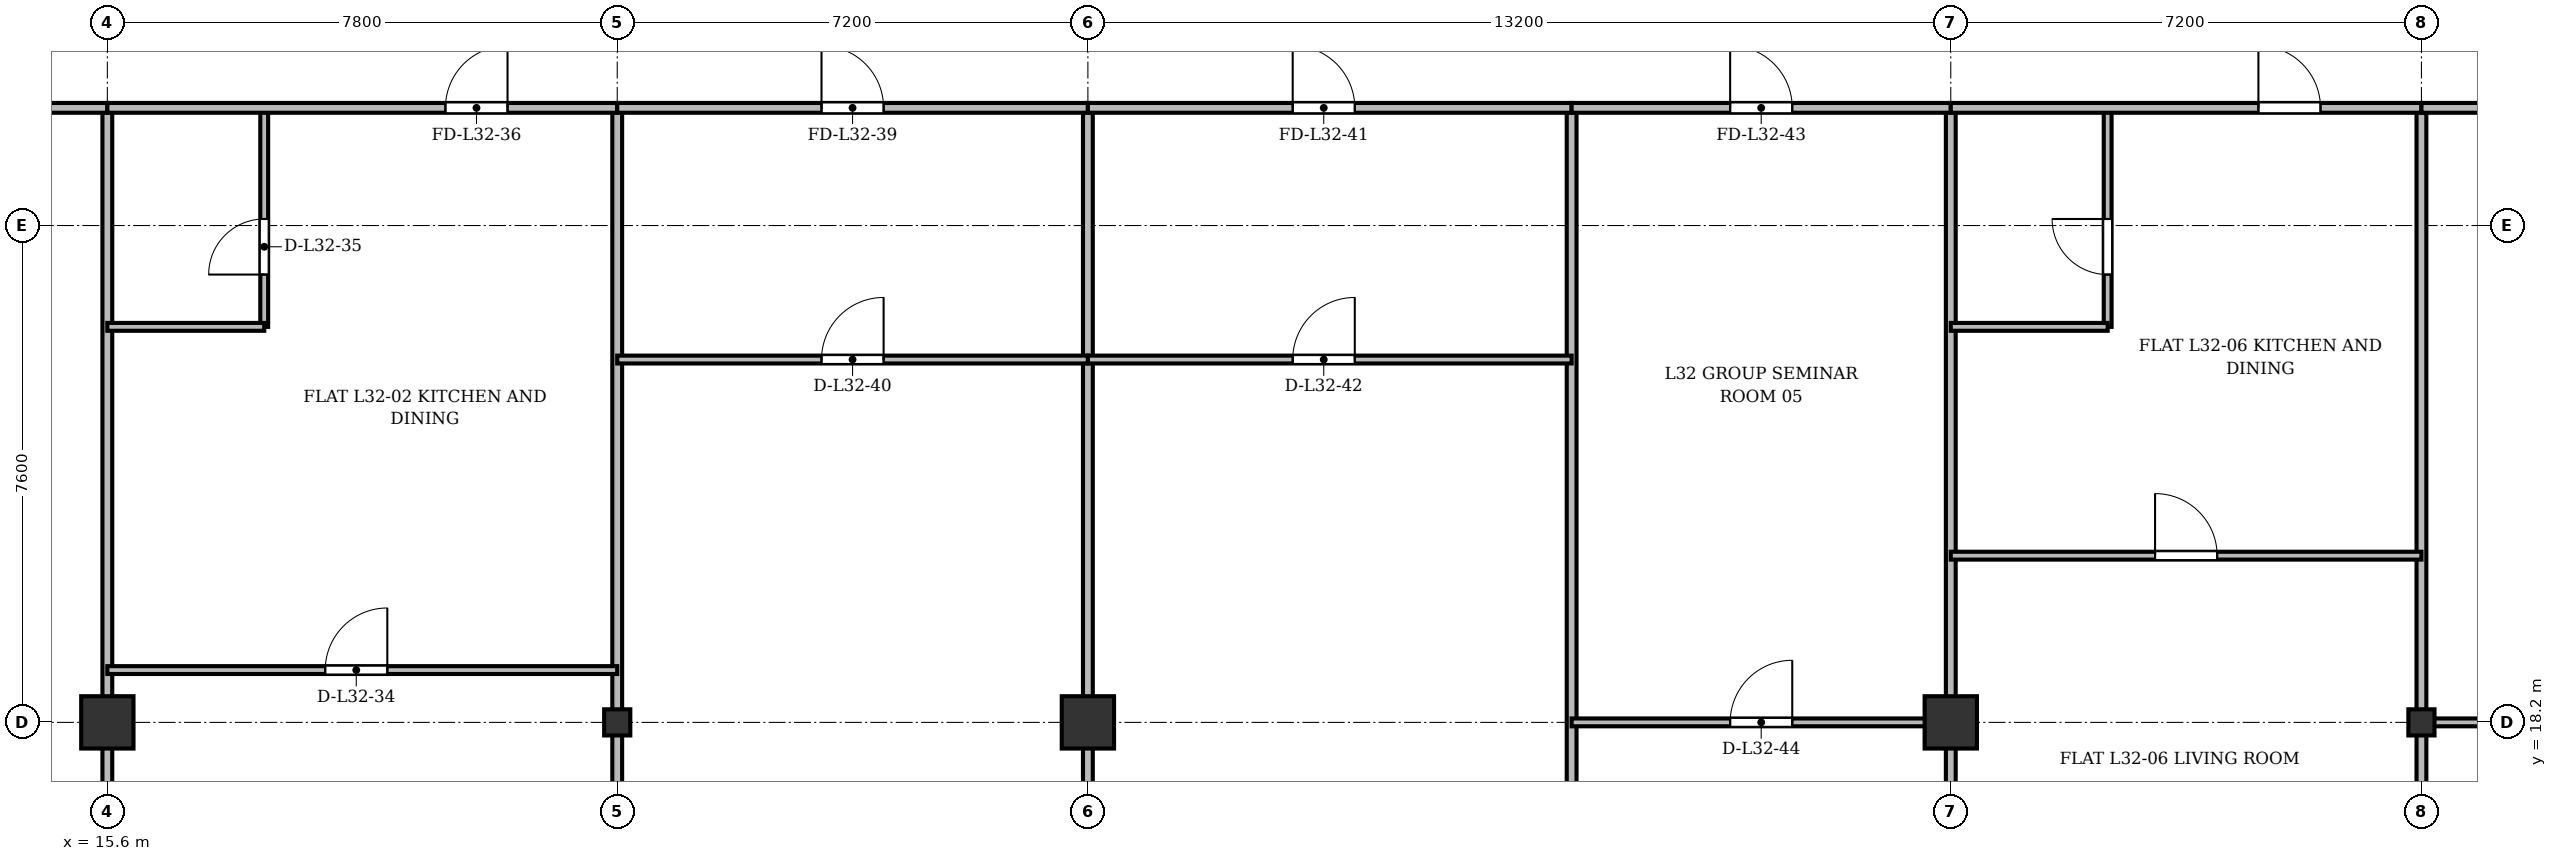
"""IFC4 building model, lengths in metres.
Left out: names, types, materials, properties, quantities, classifications, styles, units other than length and angle.
Written with IfcOpenShell. Run it as: python <this file> out.ifc"""

import sys

from ifc_helpers import new_model, si_unit, direction, frame, frame_2d, origin, origin_2d, place, context, subcontext, project, spatial, rectangle, i_section, extrude, source, transform, mapped, element, fill, save


model = new_model("IFC4")
c1 = context("Model", 3, precision=1e-05, world=origin(), true_north=direction((0.0, 1.0)))
c2 = subcontext(c1, "Body", "Model", "MODEL_VIEW")
j1 = project(units=[si_unit("LENGTHUNIT", "METRE"), si_unit("PLANEANGLEUNIT", "RADIAN")], contexts=[c1])
p1 = place(None, origin())
s1 = spatial("IfcSite", under=j1, at=p1, CompositionType="ELEMENT")
p2 = place(p1, origin())
s2 = spatial("IfcBuilding", under=s1, at=p2, CompositionType="ELEMENT")
p3 = place(p2, frame((0.0, 0.0, 124.9)))
s3 = spatial("IfcBuildingStorey", under=s2, at=p3, CompositionType="ELEMENT", Elevation=124.9)
m1 = source(origin(), c2, "Body", "SweptSolid", [
    extrude(rectangle(XDim=0.8, YDim=0.8, at=origin_2d()), origin(), (0.0, 0.0, 1.0), 3.6),
])
p4 = place(p3, frame((15.6, 18.2, 0.0), z_axis=(0.0, 0.0, 1.0), x_axis=(1.0, 0.0, 0.0)))
e1 = element("IfcColumn", 1, at=p4, inside=s3, PredefinedType="COLUMN", context=c2, shape_type="MappedRepresentation", body=[
    mapped(m1, transform((0.0, 0.0, 0.0), x_axis=(1.0, 0.0, 0.0), y_axis=(0.0, 1.0, 0.0), z_axis=(0.0, 0.0, 1.0), scale=1.0)),
])
m2 = source(origin(), c2, "Body", "SweptSolid", [
    extrude(i_section(OverallWidth=0.4, OverallDepth=0.4, WebThickness=0.022, FlangeThickness=0.035, at=origin_2d()), origin(), (0.0, 0.0, 1.0), 3.6),
])
p5 = place(p3, frame((23.4, 18.2, 0.0), z_axis=(0.0, 0.0, 1.0), x_axis=(1.0, 0.0, 0.0)))
e2 = element("IfcColumn", 2, at=p5, inside=s3, PredefinedType="COLUMN", context=c2, shape_type="MappedRepresentation", body=[
    mapped(m2, transform((0.0, 0.0, 0.0), x_axis=(1.0, 0.0, 0.0), y_axis=(0.0, 1.0, 0.0), z_axis=(0.0, 0.0, 1.0), scale=1.0)),
])
for number, where, z_axis, x_axis in (
    (3, (30.6, 18.2, 0.0), (0.0, 0.0, 1.0), (1.0, 0.0, 0.0)),
    (4, (43.8, 18.2, 0.0), (0.0, 0.0, 1.0), (1.0, 0.0, 0.0)),
):
    element("IfcColumn", number, at=place(p3, frame(where, z_axis=z_axis, x_axis=x_axis)), inside=s3, PredefinedType="COLUMN", context=c2, shape_type="MappedRepresentation", body=[
        mapped(m1, transform((0.0, 0.0, 0.0), x_axis=(1.0, 0.0, 0.0), y_axis=(0.0, 1.0, 0.0), z_axis=(0.0, 0.0, 1.0), scale=1.0)),
    ])
p6 = place(p3, frame((51.0, 18.2, 0.0), z_axis=(0.0, 0.0, 1.0), x_axis=(1.0, 0.0, 0.0)))
e5 = element("IfcColumn", 5, at=p6, inside=s3, PredefinedType="COLUMN", context=c2, shape_type="MappedRepresentation", body=[
    mapped(m2, transform((0.0, 0.0, 0.0), x_axis=(1.0, 0.0, 0.0), y_axis=(0.0, 1.0, 0.0), z_axis=(0.0, 0.0, 1.0), scale=1.0)),
])
for number, where, z_axis, x_axis in (
    (6, (15.6, 3.145, 0.0), (0.0, 0.0, 1.0), (0.0, 1.0, 0.0)),
    (7, (23.4, 3.145, 0.0), (0.0, 0.0, 1.0), (0.0, 1.0, 0.0)),
    (8, (30.6, 3.145, 0.0), (0.0, 0.0, 1.0), (0.0, 1.0, 0.0)),
):
    element("IfcWall", number, at=place(p3, frame(where, z_axis=z_axis, x_axis=x_axis)), inside=s3, PredefinedType="PARTITIONING", context=c2, shape_type="SweptSolid", body=[
        extrude(rectangle(XDim=24.455, YDim=0.15, at=frame_2d((12.228, 0.0))), origin(), (0.0, 0.0, 1.0), 2.84),
    ])
p7 = place(p3, frame((38.0, 3.145, 0.0), z_axis=(0.0, 0.0, 1.0), x_axis=(0.0, 1.0, 0.0)))
e9 = element("IfcWall", 9, at=p7, inside=s3, PredefinedType="PARTITIONING", context=c2, shape_type="SweptSolid", body=[
    extrude(rectangle(XDim=24.455, YDim=0.15, at=frame_2d((12.228, 0.0))), origin(), (0.0, 0.0, 1.0), 2.752),
])
p8 = place(p3, frame((43.8, 3.145, 0.0), z_axis=(0.0, 0.0, 1.0), x_axis=(0.0, 1.0, 0.0)))
e10 = element("IfcWall", 10, at=p8, inside=s3, PredefinedType="PARTITIONING", context=c2, shape_type="SweptSolid", body=[
    extrude(rectangle(XDim=24.455, YDim=0.15, at=frame_2d((12.228, 0.0))), origin(), (0.0, 0.0, 1.0), 2.84),
])
p9 = place(p3, frame((51.0, 6.41, 0.0), z_axis=(0.0, 0.0, 1.0), x_axis=(0.0, 1.0, 0.0)))
e11 = element("IfcWall", 11, at=p9, inside=s3, PredefinedType="PARTITIONING", context=c2, shape_type="SweptSolid", body=[
    extrude(rectangle(XDim=21.19, YDim=0.15, at=frame_2d((10.595, 0.0))), origin(), (0.0, 0.0, 1.0), 2.84),
])
p10 = place(p3, frame((4.745, 27.6, 0.0), z_axis=(0.0, 0.0, 1.0), x_axis=(1.0, 0.0, 0.0)))
e12 = element("IfcWall", 12, at=p10, inside=s3, PredefinedType="PARTITIONING", context=c2, shape_type="SweptSolid", body=[
    extrude(rectangle(XDim=10.855, YDim=0.15, at=frame_2d((5.427, 0.0))), origin(), (0.0, 0.0, 1.0), 2.84),
])
p11 = place(p10, frame((4.537, 0.0, 0.0)))
e13 = element("IfcOpeningElement", 13, at=p11, cuts=e12, PredefinedType="OPENING", context=c2, shape_type="SweptSolid", body=[
    extrude(rectangle(XDim=1.6, YDim=2.2, at=frame_2d((0.8, 1.1))), frame((0.0, 0.085, 0.0), z_axis=(0.0, -1.0, 0.0), x_axis=(1.0, 0.0, 0.0)), (0.0, 0.0, 1.0), 0.17),
])
p12 = place(p3, frame((15.6, 19.0, 0.0), z_axis=(0.0, 0.0, 1.0), x_axis=(1.0, 0.0, 0.0)))
e14 = element("IfcWall", 14, at=p12, inside=s3, PredefinedType="PARTITIONING", context=c2, shape_type="SweptSolid", body=[
    extrude(rectangle(XDim=7.8, YDim=0.12, at=frame_2d((3.9, 0.0))), origin(), (0.0, 0.0, 1.0), 2.84),
])
p13 = place(p12, frame((3.333, 0.0, 0.0)))
e15 = element("IfcOpeningElement", 15, at=p13, cuts=e14, PredefinedType="OPENING", context=c2, shape_type="SweptSolid", body=[
    extrude(rectangle(XDim=0.95, YDim=2.15, at=frame_2d((0.475, 1.075))), frame((0.0, 0.07, 0.0), z_axis=(0.0, -1.0, 0.0), x_axis=(1.0, 0.0, 0.0)), (0.0, 0.0, 1.0), 0.14),
])
p14 = place(p3, frame((18.0, 24.25, 0.0), z_axis=(0.0, 0.0, 1.0), x_axis=(0.0, 1.0, 0.0)))
e16 = element("IfcWall", 16, at=p14, inside=s3, PredefinedType="PARTITIONING", context=c2, shape_type="SweptSolid", body=[
    extrude(rectangle(XDim=3.35, YDim=0.12, at=frame_2d((1.675, 0.0))), origin(), (0.0, 0.0, 1.0), 2.99),
])
p15 = place(p14, frame((0.8, 0.0, 0.0)))
e17 = element("IfcOpeningElement", 17, at=p15, cuts=e16, PredefinedType="OPENING", context=c2, shape_type="SweptSolid", body=[
    extrude(rectangle(XDim=0.85, YDim=2.1, at=frame_2d((0.425, 1.05))), frame((0.0, 0.07, 0.0), z_axis=(0.0, -1.0, 0.0), x_axis=(1.0, 0.0, 0.0)), (0.0, 0.0, 1.0), 0.14),
])
p16 = place(p3, frame((15.6, 24.25, 0.0), z_axis=(0.0, 0.0, 1.0), x_axis=(1.0, 0.0, 0.0)))
e18 = element("IfcWall", 18, at=p16, inside=s3, PredefinedType="PARTITIONING", context=c2, shape_type="SweptSolid", body=[
    extrude(rectangle(XDim=2.4, YDim=0.12, at=frame_2d((1.2, 0.0))), origin(), (0.0, 0.0, 1.0), 2.84),
])
p17 = place(p3, frame((15.6, 27.6, 0.0), z_axis=(0.0, 0.0, 1.0), x_axis=(1.0, 0.0, 0.0)))
e19 = element("IfcWall", 19, at=p17, inside=s3, PredefinedType="PARTITIONING", context=c2, shape_type="SweptSolid", body=[
    extrude(rectangle(XDim=7.8, YDim=0.15, at=frame_2d((3.9, 0.0))), origin(), (0.0, 0.0, 1.0), 2.84),
])
p18 = place(p17, frame((5.172, 0.0, 0.0)))
e20 = element("IfcOpeningElement", 20, at=p18, cuts=e19, PredefinedType="OPENING", context=c2, shape_type="SweptSolid", body=[
    extrude(rectangle(XDim=0.95, YDim=2.15, at=frame_2d((0.475, 1.075))), frame((0.0, 0.085, 0.0), z_axis=(0.0, -1.0, 0.0), x_axis=(1.0, 0.0, 0.0)), (0.0, 0.0, 1.0), 0.17),
])
p19 = place(p3, frame((23.4, 27.6, 0.0), z_axis=(0.0, 0.0, 1.0), x_axis=(1.0, 0.0, 0.0)))
e21 = element("IfcWall", 21, at=p19, inside=s3, PredefinedType="PARTITIONING", context=c2, shape_type="SweptSolid", body=[
    extrude(rectangle(XDim=7.2, YDim=0.15, at=frame_2d((3.6, 0.0))), origin(), (0.0, 0.0, 1.0), 2.84),
])
p20 = place(p19, frame((3.125, 0.0, 0.0)))
e22 = element("IfcOpeningElement", 22, at=p20, cuts=e21, PredefinedType="OPENING", context=c2, shape_type="SweptSolid", body=[
    extrude(rectangle(XDim=0.95, YDim=2.15, at=frame_2d((0.475, 1.075))), frame((0.0, 0.085, 0.0), z_axis=(0.0, -1.0, 0.0), x_axis=(1.0, 0.0, 0.0)), (0.0, 0.0, 1.0), 0.17),
])
p21 = place(p3, frame((23.4, 23.75, 0.0), z_axis=(0.0, 0.0, 1.0), x_axis=(1.0, 0.0, 0.0)))
e23 = element("IfcWall", 23, at=p21, inside=s3, PredefinedType="PARTITIONING", context=c2, shape_type="SweptSolid", body=[
    extrude(rectangle(XDim=7.2, YDim=0.12, at=frame_2d((3.6, 0.0))), origin(), (0.0, 0.0, 1.0), 2.84),
])
p22 = place(p21, frame((3.125, 0.0, 0.0)))
e24 = element("IfcOpeningElement", 24, at=p22, cuts=e23, PredefinedType="OPENING", context=c2, shape_type="SweptSolid", body=[
    extrude(rectangle(XDim=0.95, YDim=2.15, at=frame_2d((0.475, 1.075))), frame((0.0, 0.07, 0.0), z_axis=(0.0, -1.0, 0.0), x_axis=(1.0, 0.0, 0.0)), (0.0, 0.0, 1.0), 0.14),
])
p23 = place(p3, frame((30.6, 27.6, 0.0), z_axis=(0.0, 0.0, 1.0), x_axis=(1.0, 0.0, 0.0)))
e25 = element("IfcWall", 25, at=p23, inside=s3, PredefinedType="PARTITIONING", context=c2, shape_type="SweptSolid", body=[
    extrude(rectangle(XDim=7.4, YDim=0.15, at=frame_2d((3.7, 0.0))), origin(), (0.0, 0.0, 1.0), 2.84),
])
p24 = place(p23, frame((3.133, 0.0, 0.0)))
e26 = element("IfcOpeningElement", 26, at=p24, cuts=e25, PredefinedType="OPENING", context=c2, shape_type="SweptSolid", body=[
    extrude(rectangle(XDim=0.95, YDim=2.15, at=frame_2d((0.475, 1.075))), frame((0.0, 0.085, 0.0), z_axis=(0.0, -1.0, 0.0), x_axis=(1.0, 0.0, 0.0)), (0.0, 0.0, 1.0), 0.17),
])
p25 = place(p3, frame((30.6, 23.75, 0.0), z_axis=(0.0, 0.0, 1.0), x_axis=(1.0, 0.0, 0.0)))
e27 = element("IfcWall", 27, at=p25, inside=s3, PredefinedType="PARTITIONING", context=c2, shape_type="SweptSolid", body=[
    extrude(rectangle(XDim=7.4, YDim=0.12, at=frame_2d((3.7, 0.0))), origin(), (0.0, 0.0, 1.0), 2.84),
])
p26 = place(p25, frame((3.133, 0.0, 0.0)))
e28 = element("IfcOpeningElement", 28, at=p26, cuts=e27, PredefinedType="OPENING", context=c2, shape_type="SweptSolid", body=[
    extrude(rectangle(XDim=0.95, YDim=2.15, at=frame_2d((0.475, 1.075))), frame((0.0, 0.07, 0.0), z_axis=(0.0, -1.0, 0.0), x_axis=(1.0, 0.0, 0.0)), (0.0, 0.0, 1.0), 0.14),
])
p27 = place(p3, frame((38.0, 27.6, 0.0), z_axis=(0.0, 0.0, 1.0), x_axis=(1.0, 0.0, 0.0)))
e29 = element("IfcWall", 29, at=p27, inside=s3, PredefinedType="PARTITIONING", context=c2, shape_type="SweptSolid", body=[
    extrude(rectangle(XDim=5.8, YDim=0.15, at=frame_2d((2.9, 0.0))), origin(), (0.0, 0.0, 1.0), 2.84),
])
p28 = place(p27, frame((2.425, 0.0, 0.0)))
e30 = element("IfcOpeningElement", 30, at=p28, cuts=e29, PredefinedType="OPENING", context=c2, shape_type="SweptSolid", body=[
    extrude(rectangle(XDim=0.95, YDim=2.15, at=frame_2d((0.475, 1.075))), frame((0.0, 0.085, 0.0), z_axis=(0.0, -1.0, 0.0), x_axis=(1.0, 0.0, 0.0)), (0.0, 0.0, 1.0), 0.17),
])
p29 = place(p3, frame((38.0, 18.2, 0.0), z_axis=(0.0, 0.0, 1.0), x_axis=(1.0, 0.0, 0.0)))
e31 = element("IfcWall", 31, at=p29, inside=s3, PredefinedType="PARTITIONING", context=c2, shape_type="SweptSolid", body=[
    extrude(rectangle(XDim=5.8, YDim=0.12, at=frame_2d((2.9, 0.0))), origin(), (0.0, 0.0, 1.0), 2.752),
])
p30 = place(p29, frame((2.425, 0.0, 0.0)))
e32 = element("IfcOpeningElement", 32, at=p30, cuts=e31, PredefinedType="OPENING", context=c2, shape_type="SweptSolid", body=[
    extrude(rectangle(XDim=0.95, YDim=2.15, at=frame_2d((0.475, 1.075))), frame((0.0, 0.07, 0.0), z_axis=(0.0, -1.0, 0.0), x_axis=(1.0, 0.0, 0.0)), (0.0, 0.0, 1.0), 0.14),
])
p31 = place(p3, frame((43.8, 20.75, 0.0), z_axis=(0.0, 0.0, 1.0), x_axis=(1.0, 0.0, 0.0)))
e33 = element("IfcWall", 33, at=p31, inside=s3, PredefinedType="PARTITIONING", context=c2, shape_type="SweptSolid", body=[
    extrude(rectangle(XDim=7.2, YDim=0.12, at=frame_2d((3.6, 0.0))), origin(), (0.0, 0.0, 1.0), 2.84),
])
p32 = place(p31, frame((3.125, 0.0, 0.0)))
e34 = element("IfcOpeningElement", 34, at=p32, cuts=e33, PredefinedType="OPENING", context=c2, shape_type="SweptSolid", body=[
    extrude(rectangle(XDim=0.95, YDim=2.15, at=frame_2d((0.475, 1.075))), frame((0.0, 0.07, 0.0), z_axis=(0.0, -1.0, 0.0), x_axis=(1.0, 0.0, 0.0)), (0.0, 0.0, 1.0), 0.14),
])
p33 = place(p3, frame((46.2, 24.25, 0.0), z_axis=(0.0, 0.0, 1.0), x_axis=(0.0, 1.0, 0.0)))
e35 = element("IfcWall", 35, at=p33, inside=s3, PredefinedType="PARTITIONING", context=c2, shape_type="SweptSolid", body=[
    extrude(rectangle(XDim=3.35, YDim=0.12, at=frame_2d((1.675, 0.0))), origin(), (0.0, 0.0, 1.0), 2.99),
])
p34 = place(p33, frame((0.8, 0.0, 0.0)))
e36 = element("IfcOpeningElement", 36, at=p34, cuts=e35, PredefinedType="OPENING", context=c2, shape_type="SweptSolid", body=[
    extrude(rectangle(XDim=0.85, YDim=2.1, at=frame_2d((0.425, 1.05))), frame((0.0, 0.07, 0.0), z_axis=(0.0, -1.0, 0.0), x_axis=(1.0, 0.0, 0.0)), (0.0, 0.0, 1.0), 0.14),
])
p35 = place(p3, frame((43.8, 24.25, 0.0), z_axis=(0.0, 0.0, 1.0), x_axis=(1.0, 0.0, 0.0)))
e37 = element("IfcWall", 37, at=p35, inside=s3, PredefinedType="PARTITIONING", context=c2, shape_type="SweptSolid", body=[
    extrude(rectangle(XDim=2.4, YDim=0.12, at=frame_2d((1.2, 0.0))), origin(), (0.0, 0.0, 1.0), 2.84),
])
p36 = place(p3, frame((43.8, 27.6, 0.0), z_axis=(0.0, 0.0, 1.0), x_axis=(1.0, 0.0, 0.0)))
e38 = element("IfcWall", 38, at=p36, inside=s3, PredefinedType="PARTITIONING", context=c2, shape_type="SweptSolid", body=[
    extrude(rectangle(XDim=7.2, YDim=0.15, at=frame_2d((3.6, 0.0))), origin(), (0.0, 0.0, 1.0), 2.84),
])
p37 = place(p36, frame((4.706, 0.0, 0.0)))
e39 = element("IfcOpeningElement", 39, at=p37, cuts=e38, PredefinedType="OPENING", context=c2, shape_type="SweptSolid", body=[
    extrude(rectangle(XDim=0.95, YDim=2.15, at=frame_2d((0.475, 1.075))), frame((0.0, 0.085, 0.0), z_axis=(0.0, -1.0, 0.0), x_axis=(1.0, 0.0, 0.0)), (0.0, 0.0, 1.0), 0.17),
])
p38 = place(p3, frame((51.0, 27.6, 0.0), z_axis=(0.0, 0.0, 1.0), x_axis=(1.0, 0.0, 0.0)))
e40 = element("IfcWall", 40, at=p38, inside=s3, PredefinedType="PARTITIONING", context=c2, shape_type="SweptSolid", body=[
    extrude(rectangle(XDim=7.8, YDim=0.15, at=frame_2d((3.9, 0.0))), origin(), (0.0, 0.0, 1.0), 2.84),
])
p39 = place(p38, frame((3.333, 0.0, 0.0)))
e41 = element("IfcOpeningElement", 41, at=p39, cuts=e40, PredefinedType="OPENING", context=c2, shape_type="SweptSolid", body=[
    extrude(rectangle(XDim=0.95, YDim=2.15, at=frame_2d((0.475, 1.075))), frame((0.0, 0.085, 0.0), z_axis=(0.0, -1.0, 0.0), x_axis=(1.0, 0.0, 0.0)), (0.0, 0.0, 1.0), 0.17),
])
p40 = place(p3, frame((51.0, 18.2, 0.0), z_axis=(0.0, 0.0, 1.0), x_axis=(1.0, 0.0, 0.0)))
e42 = element("IfcWall", 42, at=p40, inside=s3, PredefinedType="PARTITIONING", context=c2, shape_type="SweptSolid", body=[
    extrude(rectangle(XDim=7.8, YDim=0.12, at=frame_2d((3.9, 0.0))), origin(), (0.0, 0.0, 1.0), 2.752),
])
p41 = place(p40, frame((3.333, 0.0, 0.0)))
e43 = element("IfcOpeningElement", 43, at=p41, cuts=e42, PredefinedType="OPENING", context=c2, shape_type="SweptSolid", body=[
    extrude(rectangle(XDim=0.95, YDim=2.15, at=frame_2d((0.475, 1.075))), frame((0.0, 0.07, 0.0), z_axis=(0.0, -1.0, 0.0), x_axis=(1.0, 0.0, 0.0)), (0.0, 0.0, 1.0), 0.14),
])
m3 = source(origin(), c2, "Body", "SweptSolid", [
    extrude(rectangle(XDim=0.95, YDim=2.15, at=frame_2d((0.475, 1.075))), frame((0.0, 0.025, 0.0), z_axis=(0.0, -1.0, 0.0), x_axis=(1.0, 0.0, 0.0)), (0.0, 0.0, 1.0), 0.05),
])
p42 = place(p13, origin())
e44 = element("IfcDoor", 44, at=p42, inside=s3, OperationType="SINGLE_SWING_RIGHT", PredefinedType="DOOR", context=c2, shape_type="MappedRepresentation", body=[
    mapped(m3, transform((0.0, 0.0, 0.0), x_axis=(1.0, 0.0, 0.0), y_axis=(0.0, 1.0, 0.0), z_axis=(0.0, 0.0, 1.0), scale=1.0)),
])
fill(e15, e44)
m4 = source(origin(), c2, "Body", "SweptSolid", [
    extrude(rectangle(XDim=0.85, YDim=2.1, at=frame_2d((0.425, 1.05))), frame((0.0, 0.025, 0.0), z_axis=(0.0, -1.0, 0.0), x_axis=(1.0, 0.0, 0.0)), (0.0, 0.0, 1.0), 0.05),
])
p43 = place(p15, origin())
e45 = element("IfcDoor", 45, at=p43, inside=s3, OperationType="SINGLE_SWING_LEFT", PredefinedType="DOOR", context=c2, shape_type="MappedRepresentation", body=[
    mapped(m4, transform((0.0, 0.0, 0.0), x_axis=(1.0, 0.0, 0.0), y_axis=(0.0, 1.0, 0.0), z_axis=(0.0, 0.0, 1.0), scale=1.0)),
])
fill(e17, e45)
p44 = place(p18, origin())
e46 = element("IfcDoor", 46, at=p44, inside=s3, OperationType="SINGLE_SWING_RIGHT", PredefinedType="DOOR", context=c2, shape_type="MappedRepresentation", body=[
    mapped(m3, transform((0.0, 0.0, 0.0), x_axis=(1.0, 0.0, 0.0), y_axis=(0.0, 1.0, 0.0), z_axis=(0.0, 0.0, 1.0), scale=1.0)),
])
fill(e20, e46)
p45 = place(p20, origin())
e47 = element("IfcDoor", 47, at=p45, inside=s3, OperationType="SINGLE_SWING_LEFT", PredefinedType="DOOR", context=c2, shape_type="MappedRepresentation", body=[
    mapped(m3, transform((0.0, 0.0, 0.0), x_axis=(1.0, 0.0, 0.0), y_axis=(0.0, 1.0, 0.0), z_axis=(0.0, 0.0, 1.0), scale=1.0)),
])
fill(e22, e47)
p46 = place(p22, origin())
e48 = element("IfcDoor", 48, at=p46, inside=s3, OperationType="SINGLE_SWING_RIGHT", PredefinedType="DOOR", context=c2, shape_type="MappedRepresentation", body=[
    mapped(m3, transform((0.0, 0.0, 0.0), x_axis=(1.0, 0.0, 0.0), y_axis=(0.0, 1.0, 0.0), z_axis=(0.0, 0.0, 1.0), scale=1.0)),
])
fill(e24, e48)
p47 = place(p24, origin())
e49 = element("IfcDoor", 49, at=p47, inside=s3, OperationType="SINGLE_SWING_LEFT", PredefinedType="DOOR", context=c2, shape_type="MappedRepresentation", body=[
    mapped(m3, transform((0.0, 0.0, 0.0), x_axis=(1.0, 0.0, 0.0), y_axis=(0.0, 1.0, 0.0), z_axis=(0.0, 0.0, 1.0), scale=1.0)),
])
fill(e26, e49)
p48 = place(p26, origin())
e50 = element("IfcDoor", 50, at=p48, inside=s3, OperationType="SINGLE_SWING_RIGHT", PredefinedType="DOOR", context=c2, shape_type="MappedRepresentation", body=[
    mapped(m3, transform((0.0, 0.0, 0.0), x_axis=(1.0, 0.0, 0.0), y_axis=(0.0, 1.0, 0.0), z_axis=(0.0, 0.0, 1.0), scale=1.0)),
])
fill(e28, e50)
p49 = place(p28, origin())
e51 = element("IfcDoor", 51, at=p49, inside=s3, OperationType="SINGLE_SWING_LEFT", PredefinedType="DOOR", context=c2, shape_type="MappedRepresentation", body=[
    mapped(m3, transform((0.0, 0.0, 0.0), x_axis=(1.0, 0.0, 0.0), y_axis=(0.0, 1.0, 0.0), z_axis=(0.0, 0.0, 1.0), scale=1.0)),
])
fill(e30, e51)
p50 = place(p30, origin())
e52 = element("IfcDoor", 52, at=p50, inside=s3, OperationType="SINGLE_SWING_RIGHT", PredefinedType="DOOR", context=c2, shape_type="MappedRepresentation", body=[
    mapped(m3, transform((0.0, 0.0, 0.0), x_axis=(1.0, 0.0, 0.0), y_axis=(0.0, 1.0, 0.0), z_axis=(0.0, 0.0, 1.0), scale=1.0)),
])
fill(e32, e52)
p51 = place(p32, origin())
e53 = element("IfcDoor", 53, at=p51, inside=s3, OperationType="SINGLE_SWING_LEFT", PredefinedType="DOOR", context=c2, shape_type="MappedRepresentation", body=[
    mapped(m3, transform((0.0, 0.0, 0.0), x_axis=(1.0, 0.0, 0.0), y_axis=(0.0, 1.0, 0.0), z_axis=(0.0, 0.0, 1.0), scale=1.0)),
])
fill(e34, e53)
p52 = place(p34, origin())
e54 = element("IfcDoor", 54, at=p52, inside=s3, OperationType="SINGLE_SWING_RIGHT", PredefinedType="DOOR", context=c2, shape_type="MappedRepresentation", body=[
    mapped(m4, transform((0.0, 0.0, 0.0), x_axis=(1.0, 0.0, 0.0), y_axis=(0.0, 1.0, 0.0), z_axis=(0.0, 0.0, 1.0), scale=1.0)),
])
fill(e36, e54)
p53 = place(p37, origin())
e55 = element("IfcDoor", 55, at=p53, inside=s3, OperationType="SINGLE_SWING_LEFT", PredefinedType="DOOR", context=c2, shape_type="MappedRepresentation", body=[
    mapped(m3, transform((0.0, 0.0, 0.0), x_axis=(1.0, 0.0, 0.0), y_axis=(0.0, 1.0, 0.0), z_axis=(0.0, 0.0, 1.0), scale=1.0)),
])
fill(e39, e55)
save(model, sys.argv[1])
